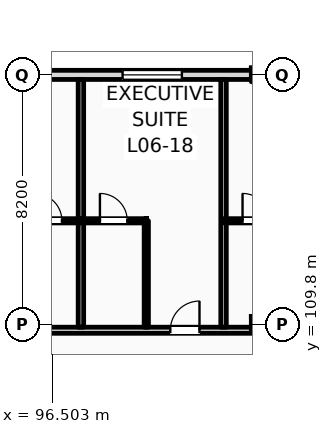
"""IFC4 building model, lengths in metres.
Left out: names, types, materials, properties, quantities, classifications, styles, units other than length and angle.
Written with IfcOpenShell. Run it as: python <this file> out.ifc"""

import sys

from ifc_helpers import new_model, si_unit, direction, frame, frame_2d, origin, origin_2d, place, context, subcontext, project, spatial, rectangle, i_section, extrude, element, fill, save


model = new_model("IFC4")
c1 = context("Model", 3, precision=1e-05, world=origin(), true_north=direction((0.0, 1.0)))
c2 = subcontext(c1, "Body", "Model", "MODEL_VIEW")
j1 = project(units=[si_unit("LENGTHUNIT", "METRE"), si_unit("PLANEANGLEUNIT", "RADIAN")], contexts=[c1])
p1 = place(None, origin())
s1 = spatial("IfcSite", under=j1, at=p1, CompositionType="ELEMENT")
p2 = place(p1, origin())
s2 = spatial("IfcBuilding", under=s1, at=p2, CompositionType="ELEMENT")
p3 = place(p2, frame((0.0, 0.0, 28.2)))
s3 = spatial("IfcBuildingStorey", under=s2, at=p3, CompositionType="ELEMENT", Elevation=28.2)
p4 = place(p3, frame((103.2, 109.8, 0.0), z_axis=(0.0, 0.0, 1.0), x_axis=(1.0, 0.0, 0.0)))
e1 = element("IfcColumn", 1, at=p4, inside=s3, PredefinedType="COLUMN", context=c2, shape_type="SweptSolid", body=[
    extrude(i_section(OverallWidth=0.3, OverallDepth=0.5, WebThickness=0.014, FlangeThickness=0.028, FilletRadius=0.027, at=origin_2d()), origin(), (0.0, 0.0, 1.0), 3.6),
])
p5 = place(p3, frame((103.2, 118.0, 0.0), z_axis=(0.0, 0.0, 1.0), x_axis=(1.0, 0.0, 0.0)))
e2 = element("IfcColumn", 2, at=p5, inside=s3, PredefinedType="COLUMN", context=c2, shape_type="SweptSolid", body=[
    extrude(i_section(OverallWidth=0.3, OverallDepth=0.45, WebThickness=0.014, FlangeThickness=0.026, FilletRadius=0.027, at=origin_2d()), origin(), (0.0, 0.0, 1.0), 3.6),
])
p6 = place(p3, frame((22.5, 118.0, 0.0), z_axis=(0.0, 0.0, 1.0), x_axis=(1.0, 0.0, 0.0)))
e3 = element("IfcWall", 3, at=p6, inside=s3, PredefinedType="STANDARD", context=c2, shape_type="SweptSolid", body=[
    extrude(rectangle(XDim=97.5, YDim=0.3, at=frame_2d((48.75, 0.0))), origin(), (0.0, 0.0, 1.0), 2.8),
])
p7 = place(p6, frame((0.91, 0.0, 0.9)))
e4 = element("IfcOpeningElement", 4, at=p7, cuts=e3, PredefinedType="OPENING", context=c2, shape_type="SweptSolid", body=[
    extrude(rectangle(XDim=0.9, YDim=1.72, at=frame_2d((0.45, 0.86))), frame((0.0, 0.16, 0.0), z_axis=(0.0, -1.0, 0.0), x_axis=(1.0, 0.0, 0.0)), (0.0, 0.0, 1.0), 0.32),
])
p8 = place(p6, frame((6.561, 0.0, 0.0)))
e5 = element("IfcOpeningElement", 5, at=p8, cuts=e3, PredefinedType="OPENING", context=c2, shape_type="SweptSolid", body=[
    extrude(rectangle(XDim=1.2, YDim=2.25, at=frame_2d((0.6, 1.125))), frame((0.0, 0.16, 0.0), z_axis=(0.0, -1.0, 0.0), x_axis=(1.0, 0.0, 0.0)), (0.0, 0.0, 1.0), 0.32),
])
p9 = place(p6, frame((11.477, 0.0, 0.9)))
e6 = element("IfcOpeningElement", 6, at=p9, cuts=e3, PredefinedType="OPENING", context=c2, shape_type="SweptSolid", body=[
    extrude(rectangle(XDim=1.1, YDim=1.5, at=frame_2d((0.55, 0.75))), frame((0.0, 0.16, 0.0), z_axis=(0.0, -1.0, 0.0), x_axis=(1.0, 0.0, 0.0)), (0.0, 0.0, 1.0), 0.32),
])
p10 = place(p6, frame((15.194, 0.0, 0.9)))
e7 = element("IfcOpeningElement", 7, at=p10, cuts=e3, PredefinedType="OPENING", context=c2, shape_type="SweptSolid", body=[
    extrude(rectangle(XDim=1.25, YDim=1.6, at=frame_2d((0.625, 0.8))), frame((0.0, 0.16, 0.0), z_axis=(0.0, -1.0, 0.0), x_axis=(1.0, 0.0, 0.0)), (0.0, 0.0, 1.0), 0.32),
])
p11 = place(p6, frame((19.509, 0.0, 0.9)))
e8 = element("IfcOpeningElement", 8, at=p11, cuts=e3, PredefinedType="OPENING", context=c2, shape_type="SweptSolid", body=[
    extrude(rectangle(XDim=1.4, YDim=1.7, at=frame_2d((0.7, 0.85))), frame((0.0, 0.16, 0.0), z_axis=(0.0, -1.0, 0.0), x_axis=(1.0, 0.0, 0.0)), (0.0, 0.0, 1.0), 0.32),
])
p12 = place(p6, frame((23.258, 0.0, 0.0)))
e9 = element("IfcOpeningElement", 9, at=p12, cuts=e3, PredefinedType="OPENING", context=c2, shape_type="SweptSolid", body=[
    extrude(rectangle(XDim=1.2, YDim=2.25, at=frame_2d((0.6, 1.125))), frame((0.0, 0.16, 0.0), z_axis=(0.0, -1.0, 0.0), x_axis=(1.0, 0.0, 0.0)), (0.0, 0.0, 1.0), 0.32),
])
p13 = place(p6, frame((28.115, 0.0, 0.9)))
e10 = element("IfcOpeningElement", 10, at=p13, cuts=e3, PredefinedType="OPENING", context=c2, shape_type="SweptSolid", body=[
    extrude(rectangle(XDim=1.75, YDim=1.72, at=frame_2d((0.875, 0.86))), frame((0.0, 0.16, 0.0), z_axis=(0.0, -1.0, 0.0), x_axis=(1.0, 0.0, 0.0)), (0.0, 0.0, 1.0), 0.32),
])
p14 = place(p6, frame((31.582, 0.0, 0.9)))
e11 = element("IfcOpeningElement", 11, at=p14, cuts=e3, PredefinedType="OPENING", context=c2, shape_type="SweptSolid", body=[
    extrude(rectangle(XDim=1.35, YDim=1.72, at=frame_2d((0.675, 0.86))), frame((0.0, 0.16, 0.0), z_axis=(0.0, -1.0, 0.0), x_axis=(1.0, 0.0, 0.0)), (0.0, 0.0, 1.0), 0.32),
])
p15 = place(p6, frame((37.379, 0.0, 0.0)))
e12 = element("IfcOpeningElement", 12, at=p15, cuts=e3, PredefinedType="OPENING", context=c2, shape_type="SweptSolid", body=[
    extrude(rectangle(XDim=1.2, YDim=2.25, at=frame_2d((0.6, 1.125))), frame((0.0, 0.16, 0.0), z_axis=(0.0, -1.0, 0.0), x_axis=(1.0, 0.0, 0.0)), (0.0, 0.0, 1.0), 0.32),
])
p16 = place(p6, frame((42.663, 0.0, 0.9)))
e13 = element("IfcOpeningElement", 13, at=p16, cuts=e3, PredefinedType="OPENING", context=c2, shape_type="SweptSolid", body=[
    extrude(rectangle(XDim=1.35, YDim=1.72, at=frame_2d((0.675, 0.86))), frame((0.0, 0.16, 0.0), z_axis=(0.0, -1.0, 0.0), x_axis=(1.0, 0.0, 0.0)), (0.0, 0.0, 1.0), 0.32),
])
p17 = place(p6, frame((45.119, 0.0, 0.9)))
e14 = element("IfcOpeningElement", 14, at=p17, cuts=e3, PredefinedType="OPENING", context=c2, shape_type="SweptSolid", body=[
    extrude(rectangle(XDim=2.871, YDim=1.72, at=frame_2d((1.436, 0.86))), frame((0.0, 0.16, 0.0), z_axis=(0.0, -1.0, 0.0), x_axis=(1.0, 0.0, 0.0)), (0.0, 0.0, 1.0), 0.32),
])
p18 = place(p6, frame((50.41, 0.0, 0.9)))
e15 = element("IfcOpeningElement", 15, at=p18, cuts=e3, PredefinedType="OPENING", context=c2, shape_type="SweptSolid", body=[
    extrude(rectangle(XDim=1.8, YDim=1.72, at=frame_2d((0.9, 0.86))), frame((0.0, 0.16, 0.0), z_axis=(0.0, -1.0, 0.0), x_axis=(1.0, 0.0, 0.0)), (0.0, 0.0, 1.0), 0.32),
])
p19 = place(p6, frame((54.375, 0.0, 0.0)))
e16 = element("IfcOpeningElement", 16, at=p19, cuts=e3, PredefinedType="OPENING", context=c2, shape_type="SweptSolid", body=[
    extrude(rectangle(XDim=1.2, YDim=2.25, at=frame_2d((0.6, 1.125))), frame((0.0, 0.16, 0.0), z_axis=(0.0, -1.0, 0.0), x_axis=(1.0, 0.0, 0.0)), (0.0, 0.0, 1.0), 0.32),
])
p20 = place(p6, frame((59.052, 0.0, 0.9)))
e17 = element("IfcOpeningElement", 17, at=p20, cuts=e3, PredefinedType="OPENING", context=c2, shape_type="SweptSolid", body=[
    extrude(rectangle(XDim=1.35, YDim=1.72, at=frame_2d((0.675, 0.86))), frame((0.0, 0.16, 0.0), z_axis=(0.0, -1.0, 0.0), x_axis=(1.0, 0.0, 0.0)), (0.0, 0.0, 1.0), 0.32),
])
p21 = place(p6, frame((62.768, 0.0, 0.9)))
e18 = element("IfcOpeningElement", 18, at=p21, cuts=e3, PredefinedType="OPENING", context=c2, shape_type="SweptSolid", body=[
    extrude(rectangle(XDim=1.5, YDim=1.72, at=frame_2d((0.75, 0.86))), frame((0.0, 0.16, 0.0), z_axis=(0.0, -1.0, 0.0), x_axis=(1.0, 0.0, 0.0)), (0.0, 0.0, 1.0), 0.32),
])
p22 = place(p6, frame((68.498, 0.0, 0.0)))
e19 = element("IfcOpeningElement", 19, at=p22, cuts=e3, PredefinedType="OPENING", context=c2, shape_type="SweptSolid", body=[
    extrude(rectangle(XDim=1.2, YDim=2.25, at=frame_2d((0.6, 1.125))), frame((0.0, 0.16, 0.0), z_axis=(0.0, -1.0, 0.0), x_axis=(1.0, 0.0, 0.0)), (0.0, 0.0, 1.0), 0.32),
])
p23 = place(p6, frame((71.265, 0.0, 0.9)))
e20 = element("IfcOpeningElement", 20, at=p23, cuts=e3, PredefinedType="OPENING", context=c2, shape_type="SweptSolid", body=[
    extrude(rectangle(XDim=0.9, YDim=1.72, at=frame_2d((0.45, 0.86))), frame((0.0, 0.16, 0.0), z_axis=(0.0, -1.0, 0.0), x_axis=(1.0, 0.0, 0.0)), (0.0, 0.0, 1.0), 0.32),
])
p24 = place(p6, frame((76.316, 0.0, 0.9)))
e21 = element("IfcOpeningElement", 21, at=p24, cuts=e3, PredefinedType="OPENING", context=c2, shape_type="SweptSolid", body=[
    extrude(rectangle(XDim=1.95, YDim=1.72, at=frame_2d((0.975, 0.86))), frame((0.0, 0.16, 0.0), z_axis=(0.0, -1.0, 0.0), x_axis=(1.0, 0.0, 0.0)), (0.0, 0.0, 1.0), 0.32),
])
p25 = place(p6, frame((81.632, 0.0, 0.9)))
e22 = element("IfcOpeningElement", 22, at=p25, cuts=e3, PredefinedType="OPENING", context=c2, shape_type="SweptSolid", body=[
    extrude(rectangle(XDim=1.35, YDim=1.72, at=frame_2d((0.675, 0.86))), frame((0.0, 0.16, 0.0), z_axis=(0.0, -1.0, 0.0), x_axis=(1.0, 0.0, 0.0)), (0.0, 0.0, 1.0), 0.32),
])
p26 = place(p6, frame((84.948, 0.0, 0.9)))
e23 = element("IfcOpeningElement", 23, at=p26, cuts=e3, PredefinedType="OPENING", context=c2, shape_type="SweptSolid", body=[
    extrude(rectangle(XDim=2.25, YDim=1.72, at=frame_2d((1.125, 0.86))), frame((0.0, 0.16, 0.0), z_axis=(0.0, -1.0, 0.0), x_axis=(1.0, 0.0, 0.0)), (0.0, 0.0, 1.0), 0.32),
])
p27 = place(p6, frame((90.063, 0.0, 0.9)))
e24 = element("IfcOpeningElement", 24, at=p27, cuts=e3, PredefinedType="OPENING", context=c2, shape_type="SweptSolid", body=[
    extrude(rectangle(XDim=1.8, YDim=1.72, at=frame_2d((0.9, 0.86))), frame((0.0, 0.16, 0.0), z_axis=(0.0, -1.0, 0.0), x_axis=(1.0, 0.0, 0.0)), (0.0, 0.0, 1.0), 0.32),
])
p28 = place(p6, frame((93.529, 0.0, 0.9)))
e25 = element("IfcOpeningElement", 25, at=p28, cuts=e3, PredefinedType="OPENING", context=c2, shape_type="SweptSolid", body=[
    extrude(rectangle(XDim=2.55, YDim=1.72, at=frame_2d((1.275, 0.86))), frame((0.0, 0.16, 0.0), z_axis=(0.0, -1.0, 0.0), x_axis=(1.0, 0.0, 0.0)), (0.0, 0.0, 1.0), 0.32),
])
p29 = place(p3, frame((10.65, 109.6, 0.0), z_axis=(0.0, 0.0, 1.0), x_axis=(1.0, 0.0, 0.0)))
e26 = element("IfcWall", 26, at=p29, inside=s3, PredefinedType="PARTITIONING", context=c2, shape_type="SweptSolid", body=[
    extrude(rectangle(XDim=109.21, YDim=0.2, at=frame_2d((54.605, 0.0))), origin(), (0.0, 0.0, 1.0), 2.8),
])
p30 = place(p29, frame((12.611, 0.0, 0.0)))
e27 = element("IfcOpeningElement", 27, at=p30, cuts=e26, PredefinedType="OPENING", context=c2, shape_type="SweptSolid", body=[
    extrude(rectangle(XDim=1.02, YDim=2.2, at=frame_2d((0.51, 1.1))), frame((0.0, 0.11, 0.0), z_axis=(0.0, -1.0, 0.0), x_axis=(1.0, 0.0, 0.0)), (0.0, 0.0, 1.0), 0.22),
])
p31 = place(p29, frame((19.451, 0.0, 0.0)))
e28 = element("IfcOpeningElement", 28, at=p31, cuts=e26, PredefinedType="OPENING", context=c2, shape_type="SweptSolid", body=[
    extrude(rectangle(XDim=1.02, YDim=2.2, at=frame_2d((0.51, 1.1))), frame((0.0, 0.11, 0.0), z_axis=(0.0, -1.0, 0.0), x_axis=(1.0, 0.0, 0.0)), (0.0, 0.0, 1.0), 0.22),
])
p32 = place(p29, frame((23.842, 0.0, 0.0)))
e29 = element("IfcOpeningElement", 29, at=p32, cuts=e26, PredefinedType="OPENING", context=c2, shape_type="SweptSolid", body=[
    extrude(rectangle(XDim=1.02, YDim=2.2, at=frame_2d((0.51, 1.1))), frame((0.0, 0.11, 0.0), z_axis=(0.0, -1.0, 0.0), x_axis=(1.0, 0.0, 0.0)), (0.0, 0.0, 1.0), 0.22),
])
p33 = place(p29, frame((26.084, 0.0, 0.0)))
e30 = element("IfcOpeningElement", 30, at=p33, cuts=e26, PredefinedType="OPENING", context=c2, shape_type="SweptSolid", body=[
    extrude(rectangle(XDim=1.02, YDim=2.2, at=frame_2d((0.51, 1.1))), frame((0.0, 0.11, 0.0), z_axis=(0.0, -1.0, 0.0), x_axis=(1.0, 0.0, 0.0)), (0.0, 0.0, 1.0), 0.22),
])
p34 = place(p29, frame((32.655, 0.0, 0.0)))
e31 = element("IfcOpeningElement", 31, at=p34, cuts=e26, PredefinedType="OPENING", context=c2, shape_type="SweptSolid", body=[
    extrude(rectangle(XDim=0.96, YDim=2.2, at=frame_2d((0.48, 1.1))), frame((0.0, 0.11, 0.0), z_axis=(0.0, -1.0, 0.0), x_axis=(1.0, 0.0, 0.0)), (0.0, 0.0, 1.0), 0.22),
])
p35 = place(p29, frame((34.895, 0.0, 0.0)))
e32 = element("IfcOpeningElement", 32, at=p35, cuts=e26, PredefinedType="OPENING", context=c2, shape_type="SweptSolid", body=[
    extrude(rectangle(XDim=0.96, YDim=2.2, at=frame_2d((0.48, 1.1))), frame((0.0, 0.11, 0.0), z_axis=(0.0, -1.0, 0.0), x_axis=(1.0, 0.0, 0.0)), (0.0, 0.0, 1.0), 0.22),
])
p36 = place(p29, frame((41.436, 0.0, 0.0)))
e33 = element("IfcOpeningElement", 33, at=p36, cuts=e26, PredefinedType="OPENING", context=c2, shape_type="SweptSolid", body=[
    extrude(rectangle(XDim=0.96, YDim=2.2, at=frame_2d((0.48, 1.1))), frame((0.0, 0.11, 0.0), z_axis=(0.0, -1.0, 0.0), x_axis=(1.0, 0.0, 0.0)), (0.0, 0.0, 1.0), 0.22),
])
p37 = place(p29, frame((43.427, 0.0, 0.0)))
e34 = element("IfcOpeningElement", 34, at=p37, cuts=e26, PredefinedType="OPENING", context=c2, shape_type="SweptSolid", body=[
    extrude(rectangle(XDim=0.96, YDim=2.2, at=frame_2d((0.48, 1.1))), frame((0.0, 0.11, 0.0), z_axis=(0.0, -1.0, 0.0), x_axis=(1.0, 0.0, 0.0)), (0.0, 0.0, 1.0), 0.22),
])
p38 = place(p29, frame((50.218, 0.0, 0.0)))
e35 = element("IfcOpeningElement", 35, at=p38, cuts=e26, PredefinedType="OPENING", context=c2, shape_type="SweptSolid", body=[
    extrude(rectangle(XDim=0.96, YDim=2.2, at=frame_2d((0.48, 1.1))), frame((0.0, 0.11, 0.0), z_axis=(0.0, -1.0, 0.0), x_axis=(1.0, 0.0, 0.0)), (0.0, 0.0, 1.0), 0.22),
])
p39 = place(p29, frame((54.859, 0.0, 0.0)))
e36 = element("IfcOpeningElement", 36, at=p39, cuts=e26, PredefinedType="OPENING", context=c2, shape_type="SweptSolid", body=[
    extrude(rectangle(XDim=0.96, YDim=2.2, at=frame_2d((0.48, 1.1))), frame((0.0, 0.11, 0.0), z_axis=(0.0, -1.0, 0.0), x_axis=(1.0, 0.0, 0.0)), (0.0, 0.0, 1.0), 0.22),
])
p40 = place(p29, frame((59.0, 0.0, 0.0)))
e37 = element("IfcOpeningElement", 37, at=p40, cuts=e26, PredefinedType="OPENING", context=c2, shape_type="SweptSolid", body=[
    extrude(rectangle(XDim=0.96, YDim=2.2, at=frame_2d((0.48, 1.1))), frame((0.0, 0.11, 0.0), z_axis=(0.0, -1.0, 0.0), x_axis=(1.0, 0.0, 0.0)), (0.0, 0.0, 1.0), 0.22),
])
p41 = place(p29, frame((63.39, 0.0, 0.0)))
e38 = element("IfcOpeningElement", 38, at=p41, cuts=e26, PredefinedType="OPENING", context=c2, shape_type="SweptSolid", body=[
    extrude(rectangle(XDim=0.96, YDim=2.2, at=frame_2d((0.48, 1.1))), frame((0.0, 0.11, 0.0), z_axis=(0.0, -1.0, 0.0), x_axis=(1.0, 0.0, 0.0)), (0.0, 0.0, 1.0), 0.22),
])
p42 = place(p29, frame((65.631, 0.0, 0.0)))
e39 = element("IfcOpeningElement", 39, at=p42, cuts=e26, PredefinedType="OPENING", context=c2, shape_type="SweptSolid", body=[
    extrude(rectangle(XDim=0.96, YDim=2.2, at=frame_2d((0.48, 1.1))), frame((0.0, 0.11, 0.0), z_axis=(0.0, -1.0, 0.0), x_axis=(1.0, 0.0, 0.0)), (0.0, 0.0, 1.0), 0.22),
])
p43 = place(p29, frame((72.172, 0.0, 0.0)))
e40 = element("IfcOpeningElement", 40, at=p43, cuts=e26, PredefinedType="OPENING", context=c2, shape_type="SweptSolid", body=[
    extrude(rectangle(XDim=0.96, YDim=2.2, at=frame_2d((0.48, 1.1))), frame((0.0, 0.11, 0.0), z_axis=(0.0, -1.0, 0.0), x_axis=(1.0, 0.0, 0.0)), (0.0, 0.0, 1.0), 0.22),
])
p44 = place(p29, frame((74.413, 0.0, 0.0)))
e41 = element("IfcOpeningElement", 41, at=p44, cuts=e26, PredefinedType="OPENING", context=c2, shape_type="SweptSolid", body=[
    extrude(rectangle(XDim=0.96, YDim=2.2, at=frame_2d((0.48, 1.1))), frame((0.0, 0.11, 0.0), z_axis=(0.0, -1.0, 0.0), x_axis=(1.0, 0.0, 0.0)), (0.0, 0.0, 1.0), 0.22),
])
p45 = place(p29, frame((80.954, 0.0, 0.0)))
e42 = element("IfcOpeningElement", 42, at=p45, cuts=e26, PredefinedType="OPENING", context=c2, shape_type="SweptSolid", body=[
    extrude(rectangle(XDim=0.96, YDim=2.2, at=frame_2d((0.48, 1.1))), frame((0.0, 0.11, 0.0), z_axis=(0.0, -1.0, 0.0), x_axis=(1.0, 0.0, 0.0)), (0.0, 0.0, 1.0), 0.22),
])
p46 = place(p29, frame((83.195, 0.0, 0.0)))
e43 = element("IfcOpeningElement", 43, at=p46, cuts=e26, PredefinedType="OPENING", context=c2, shape_type="SweptSolid", body=[
    extrude(rectangle(XDim=0.96, YDim=2.2, at=frame_2d((0.48, 1.1))), frame((0.0, 0.11, 0.0), z_axis=(0.0, -1.0, 0.0), x_axis=(1.0, 0.0, 0.0)), (0.0, 0.0, 1.0), 0.22),
])
p47 = place(p29, frame((89.735, 0.0, 0.0)))
e44 = element("IfcOpeningElement", 44, at=p47, cuts=e26, PredefinedType="OPENING", context=c2, shape_type="SweptSolid", body=[
    extrude(rectangle(XDim=0.96, YDim=2.2, at=frame_2d((0.48, 1.1))), frame((0.0, 0.11, 0.0), z_axis=(0.0, -1.0, 0.0), x_axis=(1.0, 0.0, 0.0)), (0.0, 0.0, 1.0), 0.22),
])
p48 = place(p29, frame((94.126, 0.0, 0.0)))
e45 = element("IfcOpeningElement", 45, at=p48, cuts=e26, PredefinedType="OPENING", context=c2, shape_type="SweptSolid", body=[
    extrude(rectangle(XDim=0.96, YDim=2.2, at=frame_2d((0.48, 1.1))), frame((0.0, 0.11, 0.0), z_axis=(0.0, -1.0, 0.0), x_axis=(1.0, 0.0, 0.0)), (0.0, 0.0, 1.0), 0.22),
])
p49 = place(p29, frame((98.517, 0.0, 0.0)))
e46 = element("IfcOpeningElement", 46, at=p49, cuts=e26, PredefinedType="OPENING", context=c2, shape_type="SweptSolid", body=[
    extrude(rectangle(XDim=0.96, YDim=2.2, at=frame_2d((0.48, 1.1))), frame((0.0, 0.11, 0.0), z_axis=(0.0, -1.0, 0.0), x_axis=(1.0, 0.0, 0.0)), (0.0, 0.0, 1.0), 0.22),
])
p50 = place(p29, frame((102.908, 0.0, 0.0)))
e47 = element("IfcOpeningElement", 47, at=p50, cuts=e26, PredefinedType="OPENING", context=c2, shape_type="SweptSolid", body=[
    extrude(rectangle(XDim=0.96, YDim=2.2, at=frame_2d((0.48, 1.1))), frame((0.0, 0.11, 0.0), z_axis=(0.0, -1.0, 0.0), x_axis=(1.0, 0.0, 0.0)), (0.0, 0.0, 1.0), 0.22),
])
p51 = place(p29, frame((105.099, 0.0, 0.0)))
e48 = element("IfcOpeningElement", 48, at=p51, cuts=e26, PredefinedType="OPENING", context=c2, shape_type="SweptSolid", body=[
    extrude(rectangle(XDim=0.96, YDim=2.2, at=frame_2d((0.48, 1.1))), frame((0.0, 0.11, 0.0), z_axis=(0.0, -1.0, 0.0), x_axis=(1.0, 0.0, 0.0)), (0.0, 0.0, 1.0), 0.22),
])
p52 = place(p29, frame((2.716, 0.0, 0.0)))
e49 = element("IfcOpeningElement", 49, at=p52, cuts=e26, PredefinedType="OPENING", context=c2, shape_type="SweptSolid", body=[
    extrude(rectangle(XDim=1.35, YDim=2.25, at=frame_2d((0.675, 1.125))), frame((0.0, 0.11, 0.0), z_axis=(0.0, -1.0, 0.0), x_axis=(1.0, 0.0, 0.0)), (0.0, 0.0, 1.0), 0.22),
])
p53 = place(p29, frame((6.65, 0.0, 0.0)))
e50 = element("IfcOpeningElement", 50, at=p53, cuts=e26, PredefinedType="OPENING", context=c2, shape_type="SweptSolid", body=[
    extrude(rectangle(XDim=1.35, YDim=2.25, at=frame_2d((0.675, 1.125))), frame((0.0, 0.11, 0.0), z_axis=(0.0, -1.0, 0.0), x_axis=(1.0, 0.0, 0.0)), (0.0, 0.0, 1.0), 0.22),
])
p54 = place(p29, frame((10.583, 0.0, 0.0)))
e51 = element("IfcOpeningElement", 51, at=p54, cuts=e26, PredefinedType="OPENING", context=c2, shape_type="SweptSolid", body=[
    extrude(rectangle(XDim=1.35, YDim=2.25, at=frame_2d((0.675, 1.125))), frame((0.0, 0.11, 0.0), z_axis=(0.0, -1.0, 0.0), x_axis=(1.0, 0.0, 0.0)), (0.0, 0.0, 1.0), 0.22),
])
p55 = place(p3, frame((97.445, 109.7, 0.0), z_axis=(0.0, 0.0, 1.0), x_axis=(0.0, 1.0, 0.0)))
e52 = element("IfcWall", 52, at=p55, inside=s3, PredefinedType="PARTITIONING", context=c2, shape_type="SweptSolid", body=[
    extrude(rectangle(XDim=8.15, YDim=0.18, at=frame_2d((4.075, 0.0))), origin(), (0.0, 0.0, 1.0), 3.36),
])
p56 = place(p3, frame((95.295, 113.2, 0.0), z_axis=(0.0, 0.0, 1.0), x_axis=(1.0, 0.0, 0.0)))
e53 = element("IfcWall", 53, at=p56, inside=s3, PredefinedType="PARTITIONING", context=c2, shape_type="SweptSolid", body=[
    extrude(rectangle(XDim=2.15, YDim=0.14, at=frame_2d((1.075, 0.0))), origin(), (0.0, 0.0, 1.0), 3.36),
])
p57 = place(p56, frame((0.625, 0.0, 0.0)))
e54 = element("IfcOpeningElement", 54, at=p57, cuts=e53, PredefinedType="OPENING", context=c2, shape_type="SweptSolid", body=[
    extrude(rectangle(XDim=0.9, YDim=2.1, at=frame_2d((0.45, 1.05))), frame((0.0, 0.08, 0.0), z_axis=(0.0, -1.0, 0.0), x_axis=(1.0, 0.0, 0.0)), (0.0, 0.0, 1.0), 0.16),
])
p58 = place(p3, frame((102.136, 109.7, 0.0), z_axis=(0.0, 0.0, 1.0), x_axis=(0.0, 1.0, 0.0)))
e55 = element("IfcWall", 55, at=p58, inside=s3, PredefinedType="PARTITIONING", context=c2, shape_type="SweptSolid", body=[
    extrude(rectangle(XDim=8.15, YDim=0.18, at=frame_2d((4.075, 0.0))), origin(), (0.0, 0.0, 1.0), 3.36),
])
p59 = place(p3, frame((99.595, 109.7, 0.0), z_axis=(0.0, 0.0, 1.0), x_axis=(0.0, 1.0, 0.0)))
e56 = element("IfcWall", 56, at=p59, inside=s3, PredefinedType="PARTITIONING", context=c2, shape_type="SweptSolid", body=[
    extrude(rectangle(XDim=3.5, YDim=0.14, at=frame_2d((1.75, 0.0))), origin(), (0.0, 0.0, 1.0), 3.36),
])
p60 = place(p3, frame((97.445, 113.2, 0.0), z_axis=(0.0, 0.0, 1.0), x_axis=(1.0, 0.0, 0.0)))
e57 = element("IfcWall", 57, at=p60, inside=s3, PredefinedType="PARTITIONING", context=c2, shape_type="SweptSolid", body=[
    extrude(rectangle(XDim=2.15, YDim=0.14, at=frame_2d((1.075, 0.0))), origin(), (0.0, 0.0, 1.0), 3.36),
])
p61 = place(p60, frame((0.625, 0.0, 0.0)))
e58 = element("IfcOpeningElement", 58, at=p61, cuts=e57, PredefinedType="OPENING", context=c2, shape_type="SweptSolid", body=[
    extrude(rectangle(XDim=0.9, YDim=2.1, at=frame_2d((0.45, 1.05))), frame((0.0, 0.08, 0.0), z_axis=(0.0, -1.0, 0.0), x_axis=(1.0, 0.0, 0.0)), (0.0, 0.0, 1.0), 0.16),
])
p62 = place(p3, frame((102.136, 113.2, 0.0), z_axis=(0.0, 0.0, 1.0), x_axis=(1.0, 0.0, 0.0)))
e59 = element("IfcWall", 59, at=p62, inside=s3, PredefinedType="PARTITIONING", context=c2, shape_type="SweptSolid", body=[
    extrude(rectangle(XDim=2.15, YDim=0.14, at=frame_2d((1.075, 0.0))), origin(), (0.0, 0.0, 1.0), 3.36),
])
p63 = place(p62, frame((0.625, 0.0, 0.0)))
e60 = element("IfcOpeningElement", 60, at=p63, cuts=e59, PredefinedType="OPENING", context=c2, shape_type="SweptSolid", body=[
    extrude(rectangle(XDim=0.9, YDim=2.1, at=frame_2d((0.45, 1.05))), frame((0.0, 0.08, 0.0), z_axis=(0.0, -1.0, 0.0), x_axis=(1.0, 0.0, 0.0)), (0.0, 0.0, 1.0), 0.16),
])
p64 = place(p24, origin())
e61 = element("IfcWindow", 61, at=p64, inside=s3, PartitioningType="DOUBLE_PANEL_VERTICAL", PredefinedType="WINDOW", context=c2, shape_type="SweptSolid", body=[
    extrude(rectangle(XDim=1.95, YDim=1.72, at=frame_2d((0.975, 0.86))), frame((0.0, 0.03, 0.0), z_axis=(0.0, -1.0, 0.0), x_axis=(1.0, 0.0, 0.0)), (0.0, 0.0, 1.0), 0.06),
])
fill(e21, e61)
p65 = place(p57, origin())
e62 = element("IfcDoor", 62, at=p65, inside=s3, OperationType="SINGLE_SWING_LEFT", PredefinedType="DOOR", context=c2, shape_type="SweptSolid", body=[
    extrude(rectangle(XDim=0.9, YDim=2.1, at=frame_2d((0.45, 1.05))), frame((0.0, 0.025, 0.0), z_axis=(0.0, -1.0, 0.0), x_axis=(1.0, 0.0, 0.0)), (0.0, 0.0, 1.0), 0.05),
])
fill(e54, e62)
p66 = place(p47, origin())
e63 = element("IfcDoor", 63, at=p66, inside=s3, OperationType="SINGLE_SWING_RIGHT", PredefinedType="DOOR", context=c2, shape_type="SweptSolid", body=[
    extrude(rectangle(XDim=0.96, YDim=2.2, at=frame_2d((0.48, 1.1))), frame((0.0, 0.025, 0.0), z_axis=(0.0, -1.0, 0.0), x_axis=(1.0, 0.0, 0.0)), (0.0, 0.0, 1.0), 0.05),
])
fill(e44, e63)
p67 = place(p61, origin())
e64 = element("IfcDoor", 64, at=p67, inside=s3, OperationType="SINGLE_SWING_LEFT", PredefinedType="DOOR", context=c2, shape_type="SweptSolid", body=[
    extrude(rectangle(XDim=0.9, YDim=2.1, at=frame_2d((0.45, 1.05))), frame((0.0, 0.025, 0.0), z_axis=(0.0, -1.0, 0.0), x_axis=(1.0, 0.0, 0.0)), (0.0, 0.0, 1.0), 0.05),
])
fill(e58, e64)
p68 = place(p63, origin())
e65 = element("IfcDoor", 65, at=p68, inside=s3, OperationType="SINGLE_SWING_LEFT", PredefinedType="DOOR", context=c2, shape_type="SweptSolid", body=[
    extrude(rectangle(XDim=0.9, YDim=2.1, at=frame_2d((0.45, 1.05))), frame((0.0, 0.025, 0.0), z_axis=(0.0, -1.0, 0.0), x_axis=(1.0, 0.0, 0.0)), (0.0, 0.0, 1.0), 0.05),
])
fill(e60, e65)
save(model, sys.argv[1])
